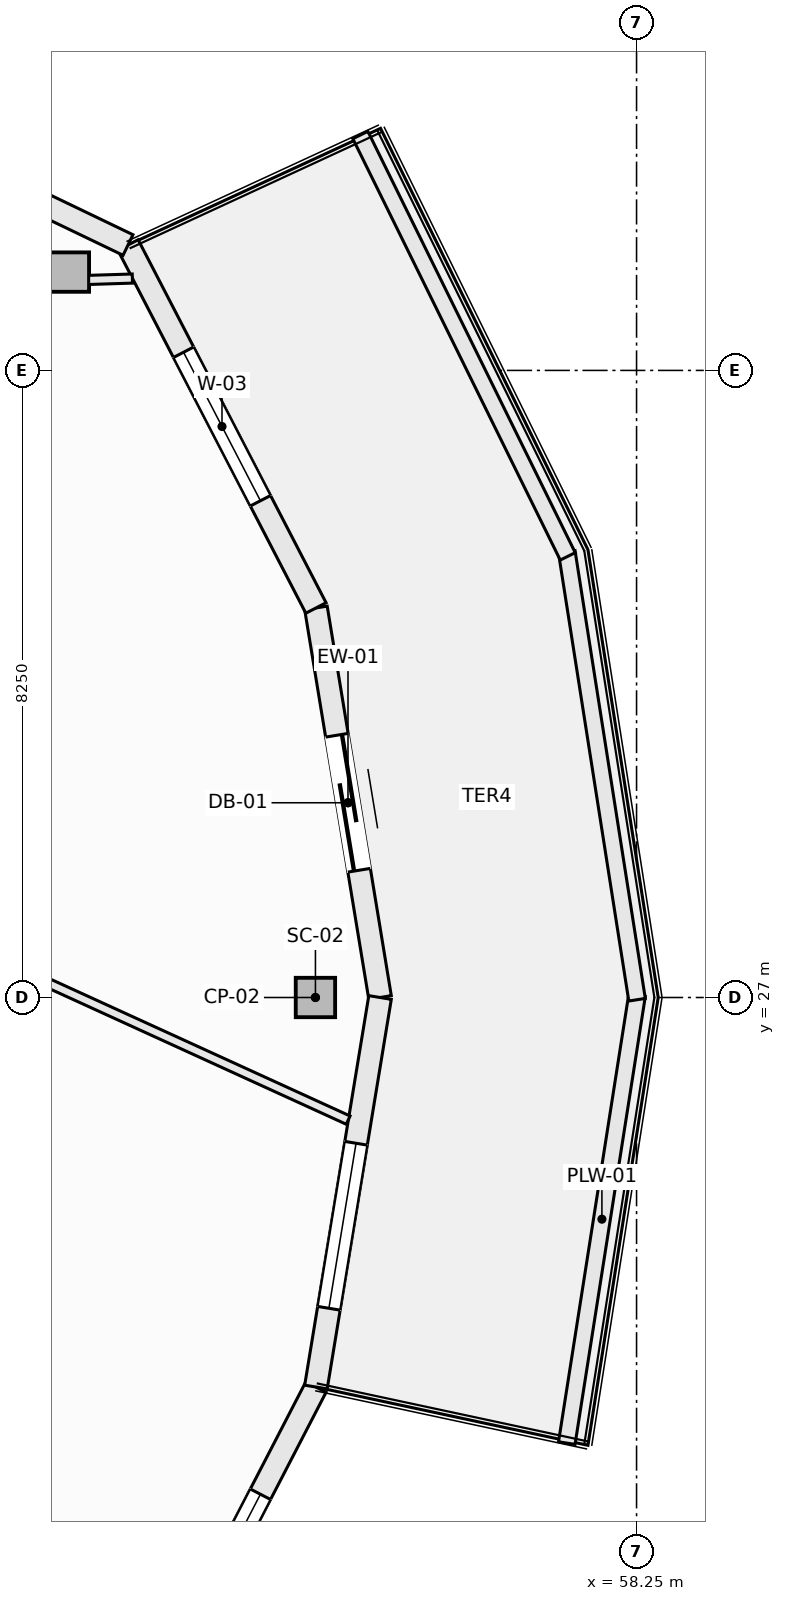
"""IFC4 building model, lengths in metres.
Left out: names, types, materials, properties, quantities, classifications, styles, units other than length and angle.
Written with IfcOpenShell. Run it as: python <this file> out.ifc"""

import sys

from ifc_helpers import new_model, si_unit, direction, frame, frame_2d, origin, origin_2d, place, context, subcontext, project, spatial, rectangle, hollow_rectangle, extrude, element, fill, save


model = new_model("IFC4")
c1 = context("Model", 3, precision=1e-05, world=origin(), true_north=direction((0.0, 1.0)))
c2 = subcontext(c1, "Body", "Model", "MODEL_VIEW")
j1 = project(units=[si_unit("LENGTHUNIT", "METRE"), si_unit("PLANEANGLEUNIT", "RADIAN")], contexts=[c1])
p1 = place(None, origin())
s1 = spatial("IfcSite", under=j1, at=p1, CompositionType="ELEMENT")
p2 = place(p1, origin())
s2 = spatial("IfcBuilding", under=s1, at=p2, CompositionType="ELEMENT")
p3 = place(p2, frame((0.0, 0.0, 236.0)))
s3 = spatial("IfcBuildingStorey", under=s2, at=p3, CompositionType="ELEMENT", Elevation=236.0)
for number, where, z_axis, x_axis in (
    (1, (54.025, 27.0, -0.27), (0.0, 0.0, 1.0), (1.0, 0.0, 0.0)),
    (2, (50.787, 36.544, -0.27), (0.0, 0.0, 1.0), (1.0, 0.0, 0.0)),
):
    element("IfcColumn", number, at=place(p3, frame(where, z_axis=z_axis, x_axis=x_axis)), inside=s3, PredefinedType="COLUMN", context=c2, shape_type="SweptSolid", body=[
        extrude(hollow_rectangle(XDim=0.508, YDim=0.508, WallThickness=0.019, at=origin_2d()), origin(), (0.0, 0.0, 1.0), 3.3),
    ])
p4 = place(p3, frame((54.032, 32.125, 0.0), z_axis=(0.0, 0.0, 1.0), x_axis=(0.16237087798, -0.986729799886, 0.0)))
e3 = element("IfcWall", 3, at=p4, inside=s3, PredefinedType="SOLIDWALL", context=c2, shape_type="SweptSolid", body=[
    extrude(rectangle(XDim=5.193, YDim=0.3, at=frame_2d((2.597, 0.0))), origin(), (0.0, 0.0, 1.0), 2.605),
])
p5 = place(p4, frame((1.697, 0.0, 0.0)))
e4 = element("IfcOpeningElement", 4, at=p5, cuts=e3, PredefinedType="OPENING", context=c2, shape_type="SweptSolid", body=[
    extrude(rectangle(XDim=1.8, YDim=2.25, at=frame_2d((0.9, 1.125))), frame((0.0, 0.16, 0.0), z_axis=(0.0, -1.0, 0.0), x_axis=(1.0, 0.0, 0.0)), (0.0, 0.0, 1.0), 0.32),
])
p6 = place(p3, frame((51.559, 36.9, 0.0), z_axis=(0.0, 0.0, 1.0), x_axis=(0.459808219482, -0.888018243786, 0.0)))
e5 = element("IfcWall", 5, at=p6, inside=s3, PredefinedType="SOLIDWALL", context=c2, shape_type="SweptSolid", body=[
    extrude(rectangle(XDim=5.378, YDim=0.3, at=frame_2d((2.689, 0.0))), origin(), (0.0, 0.0, 1.0), 2.605),
])
p7 = place(p6, frame((1.589, 0.0, 0.72)))
e6 = element("IfcOpeningElement", 6, at=p7, cuts=e5, PredefinedType="OPENING", context=c2, shape_type="SweptSolid", body=[
    extrude(rectangle(XDim=2.2, YDim=1.65, at=frame_2d((1.1, 0.825))), frame((0.0, 0.16, 0.0), z_axis=(0.0, -1.0, 0.0), x_axis=(1.0, 0.0, 0.0)), (0.0, 0.0, 1.0), 0.32),
])
p8 = place(p3, frame((46.133, 39.507, 0.0), z_axis=(0.0, 0.0, 1.0), x_axis=(0.901348331142, -0.433094892545, 0.0)))
e7 = element("IfcWall", 7, at=p8, inside=s3, PredefinedType="SOLIDWALL", context=c2, shape_type="SweptSolid", body=[
    extrude(rectangle(XDim=6.021, YDim=0.3, at=frame_2d((3.01, 0.0))), origin(), (0.0, 0.0, 1.0), 2.605),
])
p9 = place(p8, frame((1.91, 0.0, 0.72)))
e8 = element("IfcOpeningElement", 8, at=p9, cuts=e7, PredefinedType="OPENING", context=c2, shape_type="SweptSolid", body=[
    extrude(rectangle(XDim=2.2, YDim=1.65, at=frame_2d((1.1, 0.825))), frame((0.0, 0.16, 0.0), z_axis=(0.0, -1.0, 0.0), x_axis=(1.0, 0.0, 0.0)), (0.0, 0.0, 1.0), 0.32),
])
p10 = place(p3, frame((51.559, 17.1, 0.0), z_axis=(0.0, 0.0, 1.0), x_axis=(0.459808219482, 0.888018243786, 0.0)))
e9 = element("IfcWall", 9, at=p10, inside=s3, PredefinedType="SOLIDWALL", context=c2, shape_type="SweptSolid", body=[
    extrude(rectangle(XDim=5.378, YDim=0.3, at=frame_2d((2.689, 0.0))), origin(), (0.0, 0.0, 1.0), 2.605),
])
p11 = place(p10, frame((1.589, 0.0, 0.72)))
e10 = element("IfcOpeningElement", 10, at=p11, cuts=e9, PredefinedType="OPENING", context=c2, shape_type="SweptSolid", body=[
    extrude(rectangle(XDim=2.2, YDim=1.65, at=frame_2d((1.1, 0.825))), frame((0.0, 0.16, 0.0), z_axis=(0.0, -1.0, 0.0), x_axis=(1.0, 0.0, 0.0)), (0.0, 0.0, 1.0), 0.32),
])
p12 = place(p3, frame((54.032, 21.875, 0.0), z_axis=(0.0, 0.0, 1.0), x_axis=(0.16237087798, 0.986729799886, 0.0)))
e11 = element("IfcWall", 11, at=p12, inside=s3, PredefinedType="SOLIDWALL", context=c2, shape_type="SweptSolid", body=[
    extrude(rectangle(XDim=5.193, YDim=0.3, at=frame_2d((2.597, 0.0))), origin(), (0.0, 0.0, 1.0), 2.605),
])
p13 = place(p12, frame((1.05, 0.0, 0.72)))
e12 = element("IfcOpeningElement", 12, at=p13, cuts=e11, PredefinedType="OPENING", context=c2, shape_type="SweptSolid", body=[
    extrude(rectangle(XDim=2.2, YDim=1.65, at=frame_2d((1.1, 0.825))), frame((0.0, 0.16, 0.0), z_axis=(0.0, -1.0, 0.0), x_axis=(1.0, 0.0, 0.0)), (0.0, 0.0, 1.0), 0.32),
])
for number, where, z_axis, x_axis in (
    (13, (57.332, 21.138, 0.0), (0.0, 0.0, 1.0), (0.155, 0.988, 0.0)),
    (14, (57.332, 32.862, 0.0), (0.0, 0.0, 1.0), (0.155, -0.988, 0.0)),
):
    element("IfcWall", number, at=place(p3, frame(where, z_axis=z_axis, x_axis=x_axis)), inside=s3, PredefinedType="PARAPET", context=c2, shape_type="SweptSolid", body=[
        extrude(rectangle(XDim=5.964, YDim=0.22, at=frame_2d((2.982, 0.0))), origin(), (0.0, 0.0, 1.0), 0.52),
    ])
p14 = place(p3, frame((54.616, 38.347, 0.0), z_axis=(0.0, 0.0, 1.0), x_axis=(0.441640961804, -0.897191875162, 0.0)))
e15 = element("IfcWall", 15, at=p14, inside=s3, PredefinedType="PARAPET", context=c2, shape_type="SweptSolid", body=[
    extrude(rectangle(XDim=6.178, YDim=0.22, at=frame_2d((3.089, 0.0))), origin(), (0.0, 0.0, 1.0), 0.52),
])
p15 = place(p3, frame((41.555, 31.279, 0.0), z_axis=(0.0, 0.0, 1.0), x_axis=(0.909606839037, -0.41547009324, 0.0)))
e16 = element("IfcWall", 16, at=p15, inside=s3, PredefinedType="PARTITIONING", context=c2, shape_type="SweptSolid", body=[
    extrude(rectangle(XDim=14.183, YDim=0.12, at=frame_2d((7.091, 0.0))), origin(), (0.0, 0.0, 1.0), 1.823),
])
p16 = place(p3, frame((34.112, 35.912, 0.0), z_axis=(0.0, 0.0, 1.0), x_axis=(0.999512755879, 0.031212991442, 0.0)))
e17 = element("IfcWall", 17, at=p16, inside=s3, PredefinedType="PARTITIONING", context=c2, shape_type="SweptSolid", body=[
    extrude(rectangle(XDim=17.513, YDim=0.12, at=frame_2d((8.756, 0.0))), origin(), (0.0, 0.0, 1.0), 1.823),
])
p17 = place(p5, origin())
e18 = element("IfcDoor", 18, at=p17, inside=s3, OperationType="SLIDING_TO_LEFT", PredefinedType="DOOR", context=c2, shape_type="SweptSolid", body=[
    extrude(rectangle(XDim=1.8, YDim=2.25, at=frame_2d((0.9, 1.125))), frame((0.0, 0.025, 0.0), z_axis=(0.0, -1.0, 0.0), x_axis=(1.0, 0.0, 0.0)), (0.0, 0.0, 1.0), 0.05),
])
fill(e4, e18)
p18 = place(p7, origin())
e19 = element("IfcWindow", 19, at=p18, inside=s3, PartitioningType="SINGLE_PANEL", PredefinedType="WINDOW", context=c2, shape_type="SweptSolid", body=[
    extrude(rectangle(XDim=2.2, YDim=1.65, at=frame_2d((1.1, 0.825))), frame((0.0, 0.03, 0.0), z_axis=(0.0, -1.0, 0.0), x_axis=(1.0, 0.0, 0.0)), (0.0, 0.0, 1.0), 0.06),
])
fill(e6, e19)
p19 = place(p11, origin())
e20 = element("IfcWindow", 20, at=p19, inside=s3, PartitioningType="SINGLE_PANEL", PredefinedType="WINDOW", context=c2, shape_type="SweptSolid", body=[
    extrude(rectangle(XDim=2.2, YDim=1.65, at=frame_2d((1.1, 0.825))), frame((0.0, 0.03, 0.0), z_axis=(0.0, -1.0, 0.0), x_axis=(1.0, 0.0, 0.0)), (0.0, 0.0, 1.0), 0.06),
])
fill(e10, e20)
p20 = place(p13, origin())
e21 = element("IfcWindow", 21, at=p20, inside=s3, PartitioningType="SINGLE_PANEL", PredefinedType="WINDOW", context=c2, shape_type="SweptSolid", body=[
    extrude(rectangle(XDim=2.2, YDim=1.65, at=frame_2d((1.1, 0.825))), frame((0.0, 0.03, 0.0), z_axis=(0.0, -1.0, 0.0), x_axis=(1.0, 0.0, 0.0)), (0.0, 0.0, 1.0), 0.06),
])
fill(e12, e21)
save(model, sys.argv[1])
